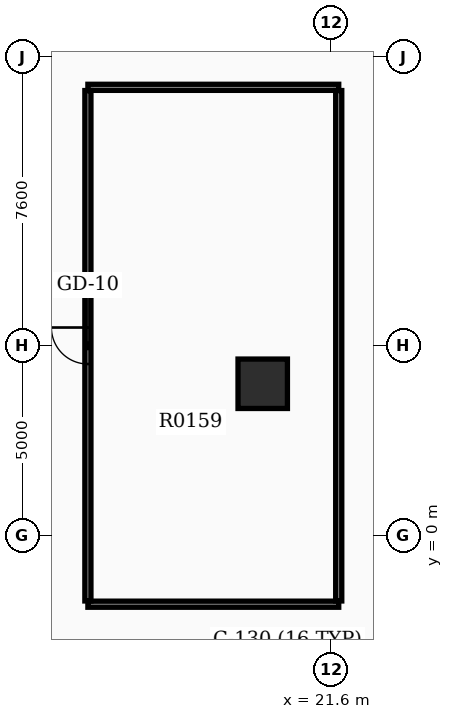
"""IFC4 building model, lengths in metres.
Left out: names, types, materials, properties, quantities, classifications, styles, units other than length and angle.
Written with IfcOpenShell. Run it as: python <this file> out.ifc"""

import sys

from ifc_helpers import new_model, si_unit, direction, frame, frame_2d, origin, origin_2d, place, context, subcontext, project, spatial, rectangle, extrude, element, fill, save


model = new_model("IFC4")
c1 = context("Model", 3, precision=1e-05, world=origin(), true_north=direction((0.0, 1.0)))
c2 = subcontext(c1, "Body", "Model", "MODEL_VIEW")
j1 = project(units=[si_unit("LENGTHUNIT", "METRE"), si_unit("PLANEANGLEUNIT", "RADIAN")], contexts=[c1])
p1 = place(None, origin())
s1 = spatial("IfcSite", under=j1, at=p1, CompositionType="ELEMENT")
p2 = place(p1, origin())
s2 = spatial("IfcBuilding", under=s1, at=p2, CompositionType="ELEMENT")
p3 = place(p2, frame((0.0, 0.0, 5.4)))
s3 = spatial("IfcBuildingStorey", under=s2, at=p3, CompositionType="ELEMENT", Elevation=5.4)
p4 = place(p3, frame((19.8, 4.0, 0.0), z_axis=(0.0, 0.0, 1.0), x_axis=(1.0, 0.0, 0.0)))
e1 = element("IfcColumn", 1, at=p4, inside=s3, PredefinedType="COLUMN", context=c2, shape_type="SweptSolid", body=[
    extrude(rectangle(XDim=1.3, YDim=1.3, at=origin_2d()), origin(), (0.0, 0.0, 1.0), 4.8),
])
for number, where, z_axis, x_axis in (
    (2, (15.2, -1.8, 0.0), (0.0, 0.0, 1.0), (1.0, 0.0, 0.0)),
    (3, (15.2, 11.8, 0.0), (0.0, 0.0, 1.0), (1.0, 0.0, 0.0)),
):
    element("IfcWall", number, at=place(p3, frame(where, z_axis=z_axis, x_axis=x_axis)), inside=s3, PredefinedType="PARTITIONING", context=c2, shape_type="SweptSolid", body=[
        extrude(rectangle(XDim=6.6, YDim=0.16, at=frame_2d((3.3, 0.0))), origin(), (0.0, 0.0, 1.0), 3.62),
    ])
p5 = place(p3, frame((15.2, -1.715, 0.0), z_axis=(0.0, 0.0, 1.0), x_axis=(0.0, 1.0, 0.0)))
e4 = element("IfcWall", 4, at=p5, inside=s3, PredefinedType="PARTITIONING", context=c2, shape_type="SweptSolid", body=[
    extrude(rectangle(XDim=13.43, YDim=0.16, at=frame_2d((6.715, 0.0))), origin(), (0.0, 0.0, 1.0), 3.62),
])
p6 = place(p5, frame((6.235, 0.0, 0.0)))
e5 = element("IfcOpeningElement", 5, at=p6, cuts=e4, PredefinedType="OPENING", context=c2, shape_type="SweptSolid", body=[
    extrude(rectangle(XDim=0.96, YDim=2.15, at=frame_2d((0.48, 1.075))), frame((0.0, 0.09, 0.0), z_axis=(0.0, -1.0, 0.0), x_axis=(1.0, 0.0, 0.0)), (0.0, 0.0, 1.0), 0.18),
])
p7 = place(p3, frame((21.8, -1.715, 0.0), z_axis=(0.0, 0.0, 1.0), x_axis=(0.0, 1.0, 0.0)))
e6 = element("IfcWall", 6, at=p7, inside=s3, PredefinedType="PARTITIONING", context=c2, shape_type="SweptSolid", body=[
    extrude(rectangle(XDim=13.43, YDim=0.16, at=frame_2d((6.715, 0.0))), origin(), (0.0, 0.0, 1.0), 3.62),
])
p8 = place(p6, origin())
e7 = element("IfcDoor", 7, at=p8, inside=s3, OperationType="SINGLE_SWING_RIGHT", PredefinedType="DOOR", context=c2, shape_type="SweptSolid", body=[
    extrude(rectangle(XDim=0.96, YDim=2.15, at=frame_2d((0.48, 1.075))), frame((0.0, 0.025, 0.0), z_axis=(0.0, -1.0, 0.0), x_axis=(1.0, 0.0, 0.0)), (0.0, 0.0, 1.0), 0.05),
])
fill(e5, e7)
save(model, sys.argv[1])
